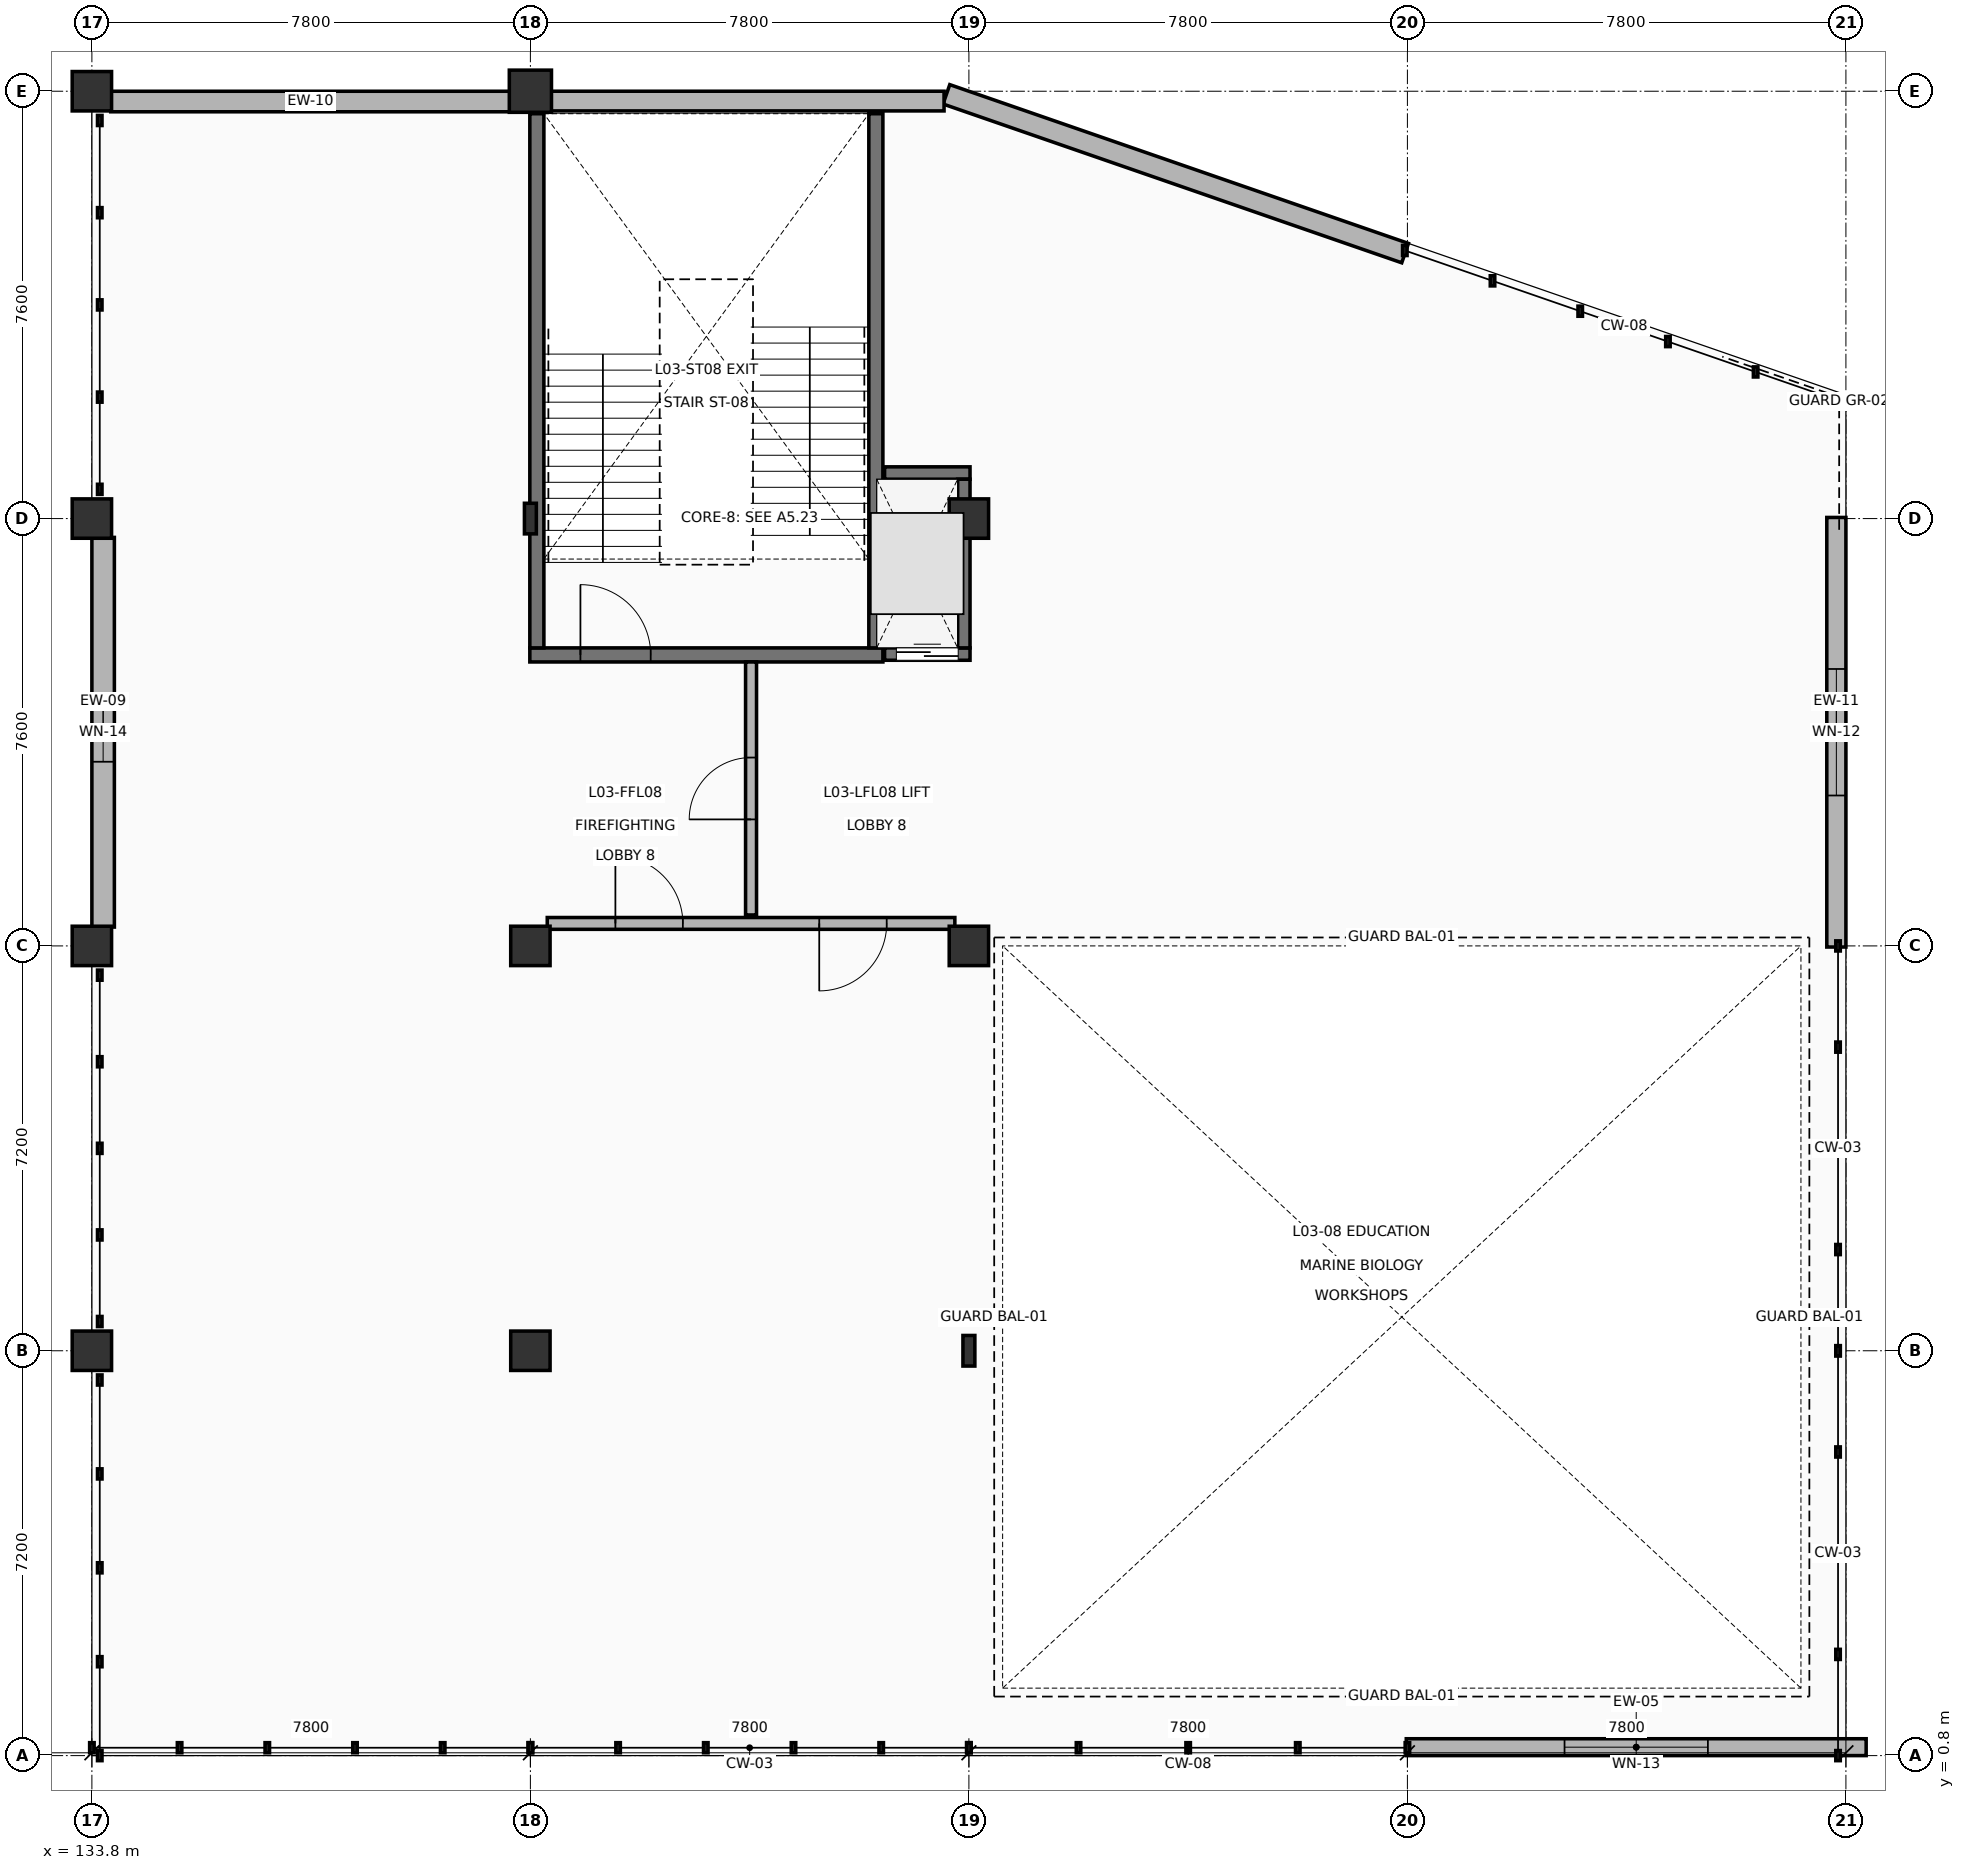
"""IFC4 building model, lengths in metres.
Left out: names, types, materials, properties, quantities, classifications, styles, units other than length and angle.
Written with IfcOpenShell. Run it as: python <this file> out.ifc"""

import sys

from ifc_helpers import new_model, si_unit, direction, frame, frame_2d, origin, origin_2d, place, context, subcontext, project, spatial, rectangle, circle, i_section, extrude, element, fill, save


model = new_model("IFC4")
c1 = context("Model", 3, precision=1e-05, world=origin(), true_north=direction((0.0, 1.0)))
c2 = subcontext(c1, "Body", "Model", "MODEL_VIEW")
j1 = project(units=[si_unit("LENGTHUNIT", "METRE"), si_unit("PLANEANGLEUNIT", "RADIAN")], contexts=[c1])
p1 = place(None, origin())
s1 = spatial("IfcSite", under=j1, at=p1, CompositionType="ELEMENT")
p2 = place(p1, origin())
s2 = spatial("IfcBuilding", under=s1, at=p2, CompositionType="ELEMENT")
p3 = place(p2, frame((0.0, 0.0, 10.5)))
s3 = spatial("IfcBuildingStorey", under=s2, at=p3, CompositionType="ELEMENT", Elevation=10.5)
for number, where, z_axis, x_axis in (
    (1, (133.8, 8.0, 0.0), (0.0, 0.0, 1.0), (1.0, 0.0, 0.0)),
    (2, (133.8, 15.2, 0.0), (0.0, 0.0, 1.0), (1.0, 0.0, 0.0)),
    (3, (133.8, 22.8, 0.0), (0.0, 0.0, 1.0), (1.0, 0.0, 0.0)),
    (4, (133.8, 30.4, 0.0), (0.0, 0.0, 1.0), (1.0, 0.0, 0.0)),
    (5, (141.6, 8.0, 0.0), (0.0, 0.0, 1.0), (1.0, 0.0, 0.0)),
    (6, (141.6, 15.2, 0.0), (0.0, 0.0, 1.0), (1.0, 0.0, 0.0)),
):
    element("IfcColumn", number, at=place(p3, frame(where, z_axis=z_axis, x_axis=x_axis)), inside=s3, PredefinedType="COLUMN", context=c2, shape_type="SweptSolid", body=[
        extrude(rectangle(XDim=0.7, YDim=0.7, at=origin_2d()), origin(), (0.0, 0.0, 1.0), 4.8),
    ])
p4 = place(p3, frame((141.6, 22.8, 0.0), z_axis=(0.0, 0.0, 1.0), x_axis=(1.0, 0.0, 0.0)))
e7 = element("IfcColumn", 7, at=p4, inside=s3, PredefinedType="COLUMN", context=c2, shape_type="SweptSolid", body=[
    extrude(i_section(OverallWidth=0.212, OverallDepth=0.544, WebThickness=0.013, FlangeThickness=0.021, at=origin_2d()), origin(), (0.0, 0.0, 1.0), 4.8),
])
p5 = place(p3, frame((141.6, 30.4, 0.0), z_axis=(0.0, 0.0, 1.0), x_axis=(1.0, 0.0, 0.0)))
e8 = element("IfcColumn", 8, at=p5, inside=s3, PredefinedType="COLUMN", context=c2, shape_type="SweptSolid", body=[
    extrude(circle(Radius=0.375, at=origin_2d()), origin(), (0.0, 0.0, 1.0), 4.8),
])
p6 = place(p3, frame((149.4, 8.0, 0.0), z_axis=(0.0, 0.0, 1.0), x_axis=(1.0, 0.0, 0.0)))
e9 = element("IfcColumn", 9, at=p6, inside=s3, PredefinedType="COLUMN", context=c2, shape_type="SweptSolid", body=[
    extrude(i_section(OverallWidth=0.212, OverallDepth=0.544, WebThickness=0.013, FlangeThickness=0.021, at=origin_2d()), origin(), (0.0, 0.0, 1.0), 4.8),
])
for number, where, z_axis, x_axis in (
    (10, (149.4, 15.2, 0.0), (0.0, 0.0, 1.0), (1.0, 0.0, 0.0)),
    (11, (149.4, 22.8, 0.0), (0.0, 0.0, 1.0), (1.0, 0.0, 0.0)),
):
    element("IfcColumn", number, at=place(p3, frame(where, z_axis=z_axis, x_axis=x_axis)), inside=s3, PredefinedType="COLUMN", context=c2, shape_type="SweptSolid", body=[
        extrude(rectangle(XDim=0.7, YDim=0.7, at=origin_2d()), origin(), (0.0, 0.0, 1.0), 4.8),
    ])
p7 = place(p3, frame((149.0, 30.345, 0.0), z_axis=(0.0, 0.0, 1.0), x_axis=(0.944995822492, -0.327082398598, 0.0)))
e12 = element("IfcWall", 12, at=p7, inside=s3, PredefinedType="SOLIDWALL", context=c2, shape_type="SweptSolid", body=[
    extrude(rectangle(XDim=8.634, YDim=0.365, at=frame_2d((4.317, 0.0))), origin(), (0.0, 0.0, 1.0), 4.56),
])
p8 = place(p3, frame((164.83, 22.82, 0.0), z_axis=(0.0, 0.0, 1.0), x_axis=(0.0, -1.0, 0.0)))
e13 = element("IfcWall", 13, at=p8, inside=s3, PredefinedType="SOLIDWALL", context=c2, shape_type="SweptSolid", body=[
    extrude(rectangle(XDim=7.64, YDim=0.34, at=frame_2d((3.82, 0.0))), origin(), (0.0, 0.0, 1.0), 4.56),
])
p9 = place(p8, frame((2.695, 0.0, 0.95)))
e14 = element("IfcOpeningElement", 14, at=p9, cuts=e13, PredefinedType="OPENING", context=c2, shape_type="SweptSolid", body=[
    extrude(rectangle(XDim=2.25, YDim=2.15, at=frame_2d((1.125, 1.075))), frame((0.0, 0.18, 0.0), z_axis=(0.0, -1.0, 0.0), x_axis=(1.0, 0.0, 0.0)), (0.0, 0.0, 1.0), 0.36),
])
p10 = place(p3, frame((165.36, 0.95, 0.0), z_axis=(0.0, 0.0, 1.0), x_axis=(-1.0, 0.0, 0.0)))
e15 = element("IfcWall", 15, at=p10, inside=s3, PredefinedType="SOLIDWALL", context=c2, shape_type="SweptSolid", body=[
    extrude(rectangle(XDim=8.18, YDim=0.3, at=frame_2d((4.09, 0.0))), origin(), (0.0, 0.0, 1.0), 4.56),
])
p11 = place(p10, frame((2.815, 0.0, 0.95)))
e16 = element("IfcOpeningElement", 16, at=p11, cuts=e15, PredefinedType="OPENING", context=c2, shape_type="SweptSolid", body=[
    extrude(rectangle(XDim=2.55, YDim=2.2, at=frame_2d((1.275, 1.1))), frame((0.0, 0.16, 0.0), z_axis=(0.0, -1.0, 0.0), x_axis=(1.0, 0.0, 0.0)), (0.0, 0.0, 1.0), 0.32),
])
p12 = place(p3, frame((134.0, 15.535, 0.0), z_axis=(0.0, 0.0, 1.0), x_axis=(0.0, 1.0, 0.0)))
e17 = element("IfcWall", 17, at=p12, inside=s3, PredefinedType="SOLIDWALL", context=c2, shape_type="SweptSolid", body=[
    extrude(rectangle(XDim=6.93, YDim=0.4, at=frame_2d((3.465, 0.0))), origin(), (0.0, 0.0, 1.0), 4.32),
])
p13 = place(p12, frame((2.94, 0.0, 0.95)))
e18 = element("IfcOpeningElement", 18, at=p13, cuts=e17, PredefinedType="OPENING", context=c2, shape_type="SweptSolid", body=[
    extrude(rectangle(XDim=1.05, YDim=1.7, at=frame_2d((0.525, 0.85))), frame((0.0, 0.21, 0.0), z_axis=(0.0, -1.0, 0.0), x_axis=(1.0, 0.0, 0.0)), (0.0, 0.0, 1.0), 0.42),
])
p14 = place(p3, frame((134.135, 30.217, 0.0), z_axis=(0.0, 0.0, 1.0), x_axis=(1.0, 0.0, 0.0)))
e19 = element("IfcWall", 19, at=p14, inside=s3, PredefinedType="SOLIDWALL", context=c2, shape_type="SweptSolid", body=[
    extrude(rectangle(XDim=7.105, YDim=0.365, at=frame_2d((3.552, 0.0))), origin(), (0.0, 0.0, 1.0), 3.953),
])
p15 = place(p3, frame((141.96, 30.225, 0.0), z_axis=(0.0, 0.0, 1.0), x_axis=(1.0, 0.0, 0.0)))
e20 = element("IfcWall", 20, at=p15, inside=s3, PredefinedType="SOLIDWALL", context=c2, shape_type="SweptSolid", body=[
    extrude(rectangle(XDim=6.998, YDim=0.35, at=frame_2d((3.499, 0.0))), origin(), (0.0, 0.0, 1.0), 4.575),
])
p16 = place(p3, frame((141.59, 20.375, 0.0), z_axis=(0.0, 0.0, 1.0), x_axis=(1.0, 0.0, 0.0)))
e21 = element("IfcWall", 21, at=p16, inside=s3, PredefinedType="SHEAR", context=c2, shape_type="SweptSolid", body=[
    extrude(rectangle(XDim=6.28, YDim=0.25, at=frame_2d((3.14, 0.0))), origin(), (0.0, 0.0, 1.0), 4.575),
])
p17 = place(p16, frame((0.9, 0.0, 0.0)))
e22 = element("IfcOpeningElement", 22, at=p17, cuts=e21, PredefinedType="OPENING", context=c2, shape_type="SweptSolid", body=[
    extrude(rectangle(XDim=1.25, YDim=2.2, at=frame_2d((0.625, 1.1))), frame((0.0, 0.135, 0.0), z_axis=(0.0, -1.0, 0.0), x_axis=(1.0, 0.0, 0.0)), (0.0, 0.0, 1.0), 0.27),
])
for number, where, z_axis, x_axis in (
    (23, (141.715, 20.5, 0.0), (0.0, 0.0, 1.0), (0.0, 1.0, 0.0)),
    (24, (147.745, 20.5, 0.0), (0.0, 0.0, 1.0), (0.0, 1.0, 0.0)),
):
    element("IfcWall", number, at=place(p3, frame(where, z_axis=z_axis, x_axis=x_axis)), inside=s3, PredefinedType="SHEAR", context=c2, shape_type="SweptSolid", body=[
        extrude(rectangle(XDim=9.5, YDim=0.25, at=frame_2d((4.75, 0.0))), origin(), (0.0, 0.0, 1.0), 4.575),
    ])
p18 = place(p3, frame((147.9, 20.39, 0.0), z_axis=(0.0, 0.0, 1.0), x_axis=(1.0, 0.0, 0.0)))
e25 = element("IfcWall", 25, at=p18, inside=s3, PredefinedType="SHEAR", context=c2, shape_type="SweptSolid", body=[
    extrude(rectangle(XDim=1.52, YDim=0.22, at=frame_2d((0.76, 0.0))), origin(), (0.0, 0.0, 1.0), 4.575),
])
p19 = place(p18, frame((0.21, 0.0, 0.0)))
e26 = element("IfcOpeningElement", 26, at=p19, cuts=e25, PredefinedType="OPENING", context=c2, shape_type="SweptSolid", body=[
    extrude(rectangle(XDim=1.1, YDim=2.15, at=frame_2d((0.55, 1.075))), frame((0.0, 0.12, 0.0), z_axis=(0.0, -1.0, 0.0), x_axis=(1.0, 0.0, 0.0)), (0.0, 0.0, 1.0), 0.24),
])
p20 = place(p3, frame((147.9, 23.61, 0.0), z_axis=(0.0, 0.0, 1.0), x_axis=(1.0, 0.0, 0.0)))
e27 = element("IfcWall", 27, at=p20, inside=s3, PredefinedType="SHEAR", context=c2, shape_type="SweptSolid", body=[
    extrude(rectangle(XDim=1.52, YDim=0.22, at=frame_2d((0.76, 0.0))), origin(), (0.0, 0.0, 1.0), 4.575),
])
p21 = place(p3, frame((149.31, 20.5, 0.0), z_axis=(0.0, 0.0, 1.0), x_axis=(0.0, 1.0, 0.0)))
e28 = element("IfcWall", 28, at=p21, inside=s3, PredefinedType="SHEAR", context=c2, shape_type="SweptSolid", body=[
    extrude(rectangle(XDim=3.0, YDim=0.22, at=frame_2d((1.5, 0.0))), origin(), (0.0, 0.0, 1.0), 4.575),
])
p22 = place(p3, frame((141.9, 15.6, 0.0), z_axis=(0.0, 0.0, 1.0), x_axis=(1.0, 0.0, 0.0)))
e29 = element("IfcWall", 29, at=p22, inside=s3, PredefinedType="PARTITIONING", context=c2, shape_type="SweptSolid", body=[
    extrude(rectangle(XDim=7.25, YDim=0.21, at=frame_2d((3.625, 0.0))), origin(), (0.0, 0.0, 1.0), 4.575),
])
p23 = place(p22, frame((1.212, 0.0, 0.0)))
e30 = element("IfcOpeningElement", 30, at=p23, cuts=e29, PredefinedType="OPENING", context=c2, shape_type="SweptSolid", body=[
    extrude(rectangle(XDim=1.2, YDim=2.2, at=frame_2d((0.6, 1.1))), frame((0.0, 0.115, 0.0), z_axis=(0.0, -1.0, 0.0), x_axis=(1.0, 0.0, 0.0)), (0.0, 0.0, 1.0), 0.23),
])
p24 = place(p22, frame((4.838, 0.0, 0.0)))
e31 = element("IfcOpeningElement", 31, at=p24, cuts=e29, PredefinedType="OPENING", context=c2, shape_type="SweptSolid", body=[
    extrude(rectangle(XDim=1.2, YDim=2.2, at=frame_2d((0.6, 1.1))), frame((0.0, 0.115, 0.0), z_axis=(0.0, -1.0, 0.0), x_axis=(1.0, 0.0, 0.0)), (0.0, 0.0, 1.0), 0.23),
])
p25 = place(p3, frame((145.525, 15.75, 0.0), z_axis=(0.0, 0.0, 1.0), x_axis=(0.0, 1.0, 0.0)))
e32 = element("IfcWall", 32, at=p25, inside=s3, PredefinedType="PARTITIONING", context=c2, shape_type="SweptSolid", body=[
    extrude(rectangle(XDim=4.5, YDim=0.195, at=frame_2d((2.25, 0.0))), origin(), (0.0, 0.0, 1.0), 4.575),
])
p26 = place(p25, frame((1.7, 0.0, 0.0)))
e33 = element("IfcOpeningElement", 33, at=p26, cuts=e32, PredefinedType="OPENING", context=c2, shape_type="SweptSolid", body=[
    extrude(rectangle(XDim=1.1, YDim=2.15, at=frame_2d((0.55, 1.075))), frame((0.0, 0.107, 0.0), z_axis=(0.0, -1.0, 0.0), x_axis=(1.0, 0.0, 0.0)), (0.0, 0.0, 1.0), 0.215),
])
p27 = place(p9, origin())
e34 = element("IfcWindow", 34, at=p27, inside=s3, PartitioningType="SINGLE_PANEL", PredefinedType="WINDOW", context=c2, shape_type="SweptSolid", body=[
    extrude(rectangle(XDim=2.25, YDim=2.15, at=frame_2d((1.125, 1.075))), frame((0.0, 0.03, 0.0), z_axis=(0.0, -1.0, 0.0), x_axis=(1.0, 0.0, 0.0)), (0.0, 0.0, 1.0), 0.06),
])
fill(e14, e34)
p28 = place(p11, origin())
e35 = element("IfcWindow", 35, at=p28, inside=s3, PartitioningType="SINGLE_PANEL", PredefinedType="WINDOW", context=c2, shape_type="SweptSolid", body=[
    extrude(rectangle(XDim=2.55, YDim=2.2, at=frame_2d((1.275, 1.1))), frame((0.0, 0.03, 0.0), z_axis=(0.0, -1.0, 0.0), x_axis=(1.0, 0.0, 0.0)), (0.0, 0.0, 1.0), 0.06),
])
fill(e16, e35)
p29 = place(p13, origin())
e36 = element("IfcWindow", 36, at=p29, inside=s3, PartitioningType="SINGLE_PANEL", PredefinedType="WINDOW", context=c2, shape_type="SweptSolid", body=[
    extrude(rectangle(XDim=1.05, YDim=1.7, at=frame_2d((0.525, 0.85))), frame((0.0, 0.03, 0.0), z_axis=(0.0, -1.0, 0.0), x_axis=(1.0, 0.0, 0.0)), (0.0, 0.0, 1.0), 0.06),
])
fill(e18, e36)
p30 = place(p17, origin())
e37 = element("IfcDoor", 37, at=p30, inside=s3, OperationType="SINGLE_SWING_LEFT", PredefinedType="DOOR", context=c2, shape_type="SweptSolid", body=[
    extrude(rectangle(XDim=1.25, YDim=2.2, at=frame_2d((0.625, 1.1))), frame((0.0, 0.025, 0.0), z_axis=(0.0, -1.0, 0.0), x_axis=(1.0, 0.0, 0.0)), (0.0, 0.0, 1.0), 0.05),
])
fill(e22, e37)
p31 = place(p19, origin())
e38 = element("IfcDoor", 38, at=p31, inside=s3, OperationType="DOUBLE_DOOR_SLIDING", PredefinedType="DOOR", context=c2, shape_type="SweptSolid", body=[
    extrude(rectangle(XDim=1.1, YDim=2.15, at=frame_2d((0.55, 1.075))), frame((0.0, 0.025, 0.0), z_axis=(0.0, -1.0, 0.0), x_axis=(1.0, 0.0, 0.0)), (0.0, 0.0, 1.0), 0.05),
])
fill(e26, e38)
p32 = place(p23, origin())
e39 = element("IfcDoor", 39, at=p32, inside=s3, OperationType="SINGLE_SWING_LEFT", PredefinedType="DOOR", context=c2, shape_type="SweptSolid", body=[
    extrude(rectangle(XDim=1.2, YDim=2.2, at=frame_2d((0.6, 1.1))), frame((0.0, 0.025, 0.0), z_axis=(0.0, -1.0, 0.0), x_axis=(1.0, 0.0, 0.0)), (0.0, 0.0, 1.0), 0.05),
])
fill(e30, e39)
p33 = place(p24, origin())
e40 = element("IfcDoor", 40, at=p33, inside=s3, OperationType="SINGLE_SWING_RIGHT", PredefinedType="DOOR", context=c2, shape_type="SweptSolid", body=[
    extrude(rectangle(XDim=1.2, YDim=2.2, at=frame_2d((0.6, 1.1))), frame((0.0, 0.025, 0.0), z_axis=(0.0, -1.0, 0.0), x_axis=(1.0, 0.0, 0.0)), (0.0, 0.0, 1.0), 0.05),
])
fill(e31, e40)
p34 = place(p26, origin())
e41 = element("IfcDoor", 41, at=p34, inside=s3, OperationType="SINGLE_SWING_LEFT", PredefinedType="DOOR", context=c2, shape_type="SweptSolid", body=[
    extrude(rectangle(XDim=1.1, YDim=2.15, at=frame_2d((0.55, 1.075))), frame((0.0, 0.025, 0.0), z_axis=(0.0, -1.0, 0.0), x_axis=(1.0, 0.0, 0.0)), (0.0, 0.0, 1.0), 0.05),
])
fill(e33, e41)
save(model, sys.argv[1])
